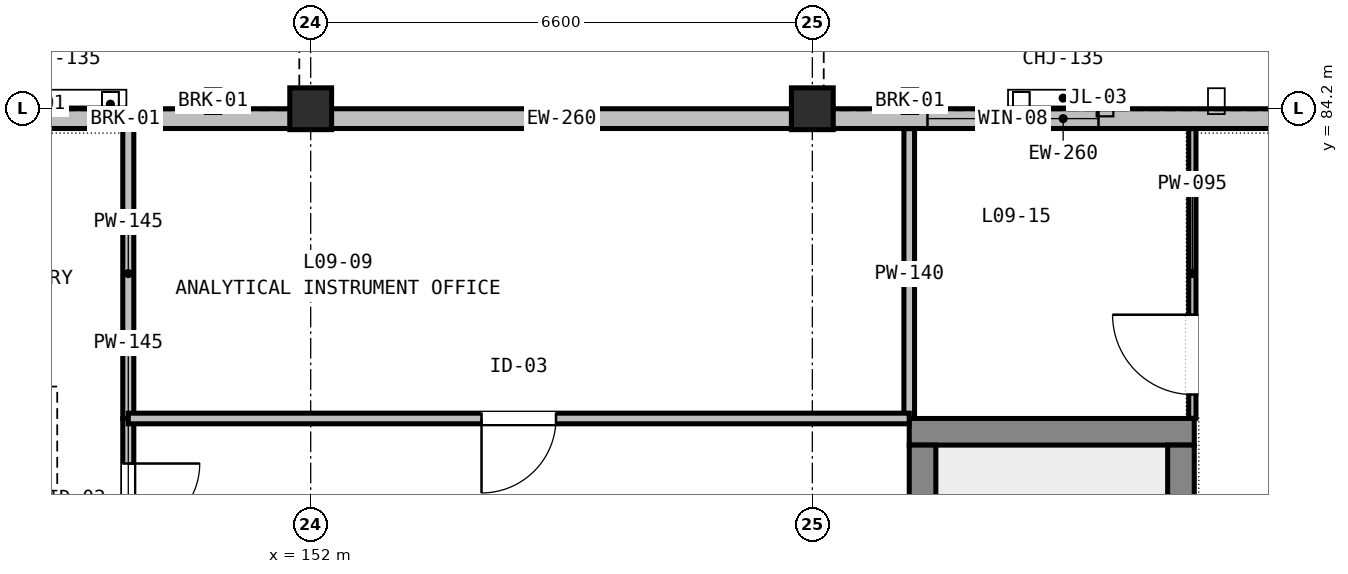
"""IFC4 building model, lengths in metres.
Left out: names, types, materials, properties, quantities, classifications, styles, units other than length and angle.
Written with IfcOpenShell. Run it as: python <this file> out.ifc"""

import sys

from ifc_helpers import new_model, si_unit, direction, frame, frame_2d, origin, origin_2d, place, context, subcontext, project, spatial, rectangle, extrude, element, fill, save


model = new_model("IFC4")
c1 = context("Model", 3, precision=1e-05, world=origin(), true_north=direction((0.0, 1.0)))
c2 = subcontext(c1, "Body", "Model", "MODEL_VIEW")
j1 = project(units=[si_unit("LENGTHUNIT", "METRE"), si_unit("PLANEANGLEUNIT", "RADIAN")], contexts=[c1])
p1 = place(None, origin())
s1 = spatial("IfcSite", under=j1, at=p1, CompositionType="ELEMENT")
p2 = place(p1, origin())
s2 = spatial("IfcBuilding", under=s1, at=p2, CompositionType="ELEMENT")
p3 = place(p2, frame((0.0, 0.0, 40.5)))
s3 = spatial("IfcBuildingStorey", under=s2, at=p3, CompositionType="ELEMENT", Elevation=40.5)
for number, where, z_axis, x_axis in (
    (1, (152.0, 84.2, 0.0), (0.0, 0.0, 1.0), (1.0, 0.0, 0.0)),
    (2, (158.6, 84.2, 0.0), (0.0, 0.0, 1.0), (1.0, 0.0, 0.0)),
):
    element("IfcColumn", number, at=place(p3, frame(where, z_axis=z_axis, x_axis=x_axis)), inside=s3, PredefinedType="COLUMN", context=c2, shape_type="SweptSolid", body=[
        extrude(rectangle(XDim=0.55, YDim=0.55, at=origin_2d()), origin(), (0.0, 0.0, 1.0), 3.84),
    ])
p4 = place(p3, frame((159.875, 79.95, 0.0), z_axis=(0.0, 0.0, 1.0), x_axis=(1.0, 0.0, 0.0)))
e3 = element("IfcWall", 3, at=p4, inside=s3, PredefinedType="SHEAR", context=c2, shape_type="SweptSolid", body=[
    extrude(rectangle(XDim=3.75, YDim=0.35, at=frame_2d((1.875, 0.0))), origin(), (0.0, 0.0, 1.0), 3.9),
])
for number, where, z_axis, x_axis in (
    (4, (160.05, 72.4, 0.0), (0.0, 0.0, 1.0), (0.0, 1.0, 0.0)),
    (5, (163.45, 72.4, 0.0), (0.0, 0.0, 1.0), (0.0, 1.0, 0.0)),
):
    element("IfcWall", number, at=place(p3, frame(where, z_axis=z_axis, x_axis=x_axis)), inside=s3, PredefinedType="SHEAR", context=c2, shape_type="SweptSolid", body=[
        extrude(rectangle(XDim=7.375, YDim=0.35, at=frame_2d((3.688, 0.0))), origin(), (0.0, 0.0, 1.0), 3.9),
    ])
p5 = place(p3, frame((145.4, 84.07, 0.0), z_axis=(0.0, 0.0, 1.0), x_axis=(1.0, 0.0, 0.0)))
e6 = element("IfcWall", 6, at=p5, inside=s3, PredefinedType="STANDARD", context=c2, shape_type="SweptSolid", body=[
    extrude(rectangle(XDim=6.6, YDim=0.26, at=frame_2d((3.3, 0.0))), origin(), (0.0, 0.0, 1.0), 3.185),
])
p6 = place(p5, frame((0.807, 0.0, 0.9)))
e7 = element("IfcOpeningElement", 7, at=p6, cuts=e6, PredefinedType="OPENING", context=c2, shape_type="SweptSolid", body=[
    extrude(rectangle(XDim=1.95, YDim=2.1, at=frame_2d((0.975, 1.05))), frame((0.0, 0.14, 0.0), z_axis=(0.0, -1.0, 0.0), x_axis=(1.0, 0.0, 0.0)), (0.0, 0.0, 1.0), 0.28),
])
p7 = place(p3, frame((152.0, 84.07, 0.0), z_axis=(0.0, 0.0, 1.0), x_axis=(1.0, 0.0, 0.0)))
e8 = element("IfcWall", 8, at=p7, inside=s3, PredefinedType="STANDARD", context=c2, shape_type="SweptSolid", body=[
    extrude(rectangle(XDim=6.6, YDim=0.26, at=frame_2d((3.3, 0.0))), origin(), (0.0, 0.0, 1.0), 3.185),
])
p8 = place(p3, frame((158.6, 84.07, 0.0), z_axis=(0.0, 0.0, 1.0), x_axis=(1.0, 0.0, 0.0)))
e9 = element("IfcWall", 9, at=p8, inside=s3, PredefinedType="STANDARD", context=c2, shape_type="SweptSolid", body=[
    extrude(rectangle(XDim=6.6, YDim=0.26, at=frame_2d((3.3, 0.0))), origin(), (0.0, 0.0, 1.0), 3.185),
])
p9 = place(p8, frame((1.515, 0.0, 0.9)))
e10 = element("IfcOpeningElement", 10, at=p9, cuts=e9, PredefinedType="OPENING", context=c2, shape_type="SweptSolid", body=[
    extrude(rectangle(XDim=2.25, YDim=2.1, at=frame_2d((1.125, 1.05))), frame((0.0, 0.14, 0.0), z_axis=(0.0, -1.0, 0.0), x_axis=(1.0, 0.0, 0.0)), (0.0, 0.0, 1.0), 0.28),
])
p10 = place(p3, frame((149.6, 83.938, 0.0), z_axis=(0.0, 0.0, 1.0), x_axis=(0.0, -1.0, 0.0)))
e11 = element("IfcWall", 11, at=p10, inside=s3, PredefinedType="PARTITIONING", context=c2, shape_type="SweptSolid", body=[
    extrude(rectangle(XDim=3.813, YDim=0.145, at=frame_2d((1.906, 0.0))), origin(), (0.0, 0.0, 1.0), 3.335),
])
p11 = place(p3, frame((149.6, 80.125, 0.0), z_axis=(0.0, 0.0, 1.0), x_axis=(0.0, -1.0, 0.0)))
e12 = element("IfcWall", 12, at=p11, inside=s3, PredefinedType="PARTITIONING", context=c2, shape_type="SweptSolid", body=[
    extrude(rectangle(XDim=2.125, YDim=0.145, at=frame_2d((1.062, 0.0))), origin(), (0.0, 0.0, 1.0), 3.655),
])
p12 = place(p11, frame((0.593, 0.0, 0.0)))
e13 = element("IfcOpeningElement", 13, at=p12, cuts=e12, PredefinedType="OPENING", context=c2, shape_type="SweptSolid", body=[
    extrude(rectangle(XDim=0.94, YDim=2.02, at=frame_2d((0.47, 1.01))), frame((0.0, 0.083, 0.0), z_axis=(0.0, -1.0, 0.0), x_axis=(1.0, 0.0, 0.0)), (0.0, 0.0, 1.0), 0.165),
])
p13 = place(p3, frame((159.875, 83.938, 0.0), z_axis=(0.0, 0.0, 1.0), x_axis=(0.0, -1.0, 0.0)))
e14 = element("IfcWall", 14, at=p13, inside=s3, PredefinedType="PARTITIONING", context=c2, shape_type="SweptSolid", body=[
    extrude(rectangle(XDim=3.811, YDim=0.14, at=frame_2d((1.906, 0.0))), origin(), (0.0, 0.0, 1.0), 3.655),
])
p14 = place(p3, frame((159.875, 80.125, 0.0), z_axis=(0.0, 0.0, 1.0), x_axis=(-1.0, 0.0, 0.0)))
e15 = element("IfcWall", 15, at=p14, inside=s3, PredefinedType="PARTITIONING", context=c2, shape_type="SweptSolid", body=[
    extrude(rectangle(XDim=10.275, YDim=0.14, at=frame_2d((5.137, 0.0))), origin(), (0.0, 0.0, 1.0), 3.185),
])
p15 = place(p14, frame((4.647, 0.0, 0.0)))
e16 = element("IfcOpeningElement", 16, at=p15, cuts=e15, PredefinedType="OPENING", context=c2, shape_type="SweptSolid", body=[
    extrude(rectangle(XDim=0.98, YDim=2.02, at=frame_2d((0.49, 1.01))), frame((0.0, 0.08, 0.0), z_axis=(0.0, -1.0, 0.0), x_axis=(1.0, 0.0, 0.0)), (0.0, 0.0, 1.0), 0.16),
])
p16 = place(p3, frame((163.6, 80.127, 0.0), z_axis=(0.0, 0.0, 1.0), x_axis=(0.0, 1.0, 0.0)))
e17 = element("IfcWall", 17, at=p16, inside=s3, PredefinedType="PARTITIONING", context=c2, shape_type="SweptSolid", body=[
    extrude(rectangle(XDim=3.811, YDim=0.095, at=frame_2d((1.906, 0.0))), origin(), (0.0, 0.0, 1.0), 3.655),
])
p17 = place(p16, frame((0.313, 0.0, 0.0)))
e18 = element("IfcOpeningElement", 18, at=p17, cuts=e17, PredefinedType="OPENING", context=c2, shape_type="SweptSolid", body=[
    extrude(rectangle(XDim=1.05, YDim=2.06, at=frame_2d((0.525, 1.03))), frame((0.0, 0.057, 0.0), z_axis=(0.0, -1.0, 0.0), x_axis=(1.0, 0.0, 0.0)), (0.0, 0.0, 1.0), 0.115),
])
p18 = place(p9, origin())
e19 = element("IfcWindow", 19, at=p18, inside=s3, PartitioningType="SINGLE_PANEL", PredefinedType="WINDOW", context=c2, shape_type="SweptSolid", body=[
    extrude(rectangle(XDim=2.25, YDim=2.1, at=frame_2d((1.125, 1.05))), frame((0.0, 0.03, 0.0), z_axis=(0.0, -1.0, 0.0), x_axis=(1.0, 0.0, 0.0)), (0.0, 0.0, 1.0), 0.06),
])
fill(e10, e19)
p19 = place(p12, origin())
e20 = element("IfcDoor", 20, at=p19, inside=s3, OperationType="SINGLE_SWING_LEFT", PredefinedType="DOOR", context=c2, shape_type="SweptSolid", body=[
    extrude(rectangle(XDim=0.94, YDim=2.02, at=frame_2d((0.47, 1.01))), frame((0.0, 0.025, 0.0), z_axis=(0.0, -1.0, 0.0), x_axis=(1.0, 0.0, 0.0)), (0.0, 0.0, 1.0), 0.05),
])
fill(e13, e20)
p20 = place(p15, origin())
e21 = element("IfcDoor", 21, at=p20, inside=s3, OperationType="SINGLE_SWING_RIGHT", PredefinedType="DOOR", context=c2, shape_type="SweptSolid", body=[
    extrude(rectangle(XDim=0.98, YDim=2.02, at=frame_2d((0.49, 1.01))), frame((0.0, 0.025, 0.0), z_axis=(0.0, -1.0, 0.0), x_axis=(1.0, 0.0, 0.0)), (0.0, 0.0, 1.0), 0.05),
])
fill(e16, e21)
p21 = place(p17, origin())
e22 = element("IfcDoor", 22, at=p21, inside=s3, OperationType="SINGLE_SWING_RIGHT", PredefinedType="DOOR", context=c2, shape_type="SweptSolid", body=[
    extrude(rectangle(XDim=1.05, YDim=2.06, at=frame_2d((0.525, 1.03))), frame((0.0, 0.025, 0.0), z_axis=(0.0, -1.0, 0.0), x_axis=(1.0, 0.0, 0.0)), (0.0, 0.0, 1.0), 0.05),
])
fill(e18, e22)
save(model, sys.argv[1])
